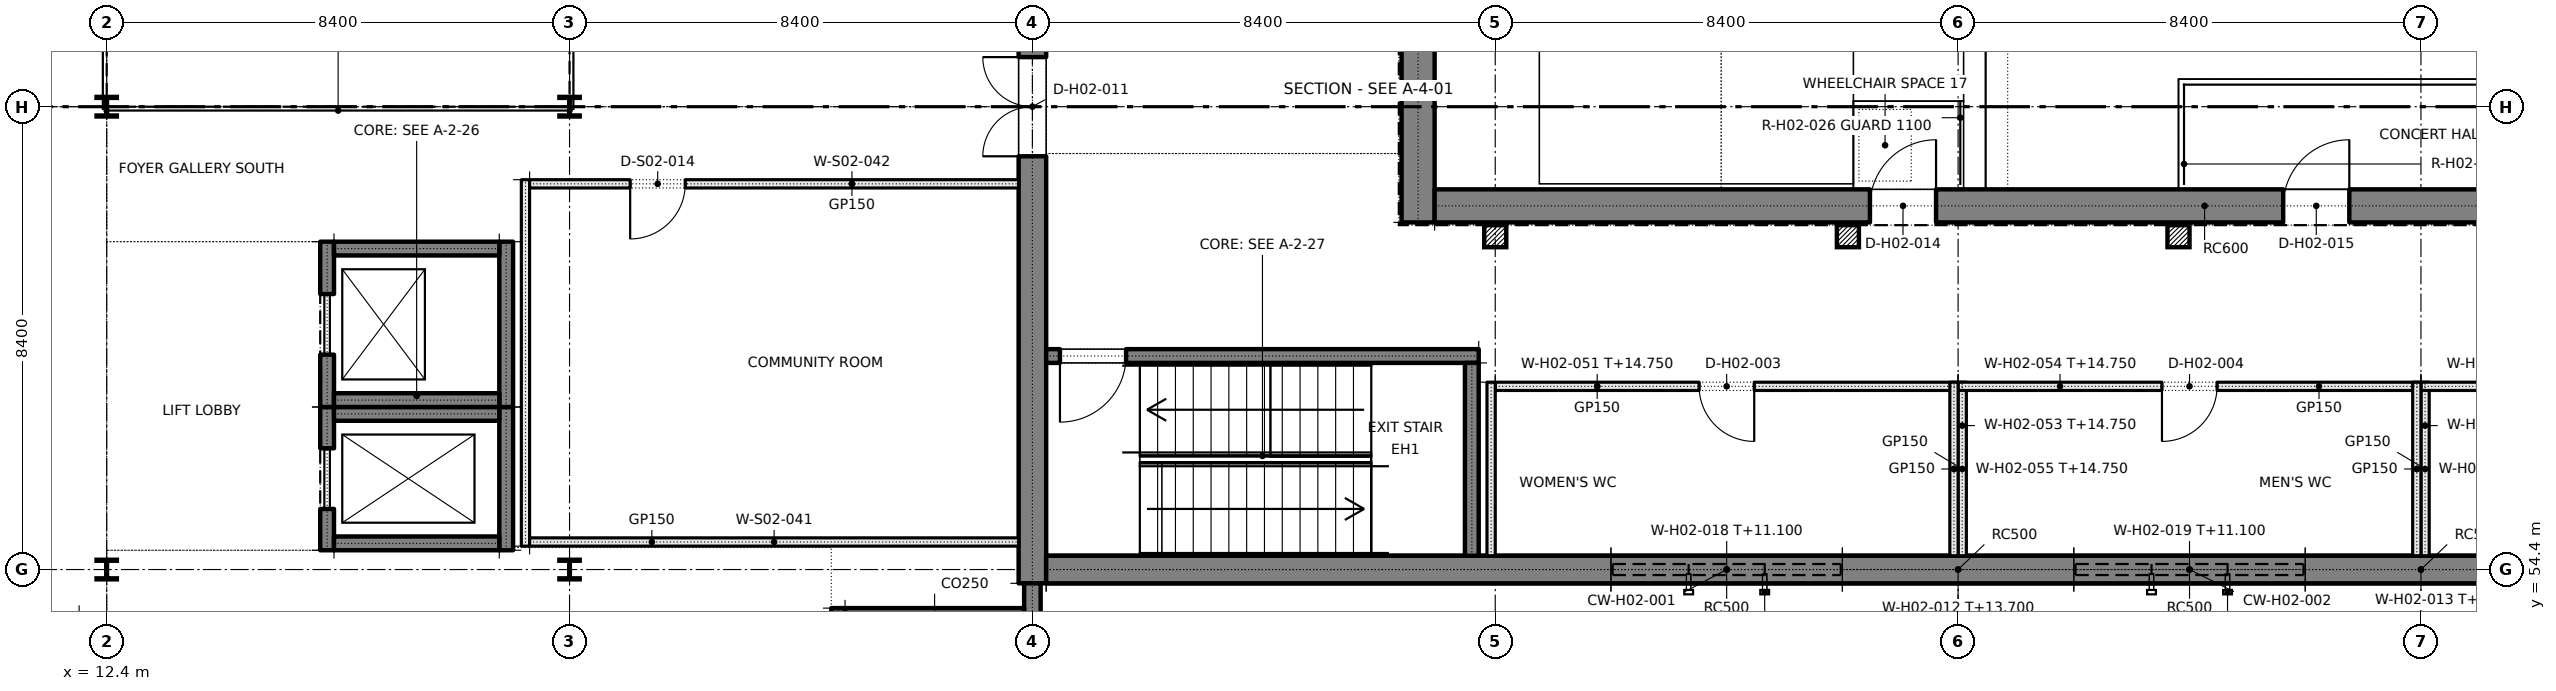
"""IFC4 building model, lengths in metres.
Left out: names, types, materials, properties, quantities, classifications, styles, units other than length and angle.
Written with IfcOpenShell. Run it as: python <this file> out.ifc"""

import sys

from ifc_helpers import new_model, si_unit, direction, frame, frame_2d, origin, origin_2d, place, context, subcontext, project, spatial, rectangle, i_section, extrude, element, fill, save


model = new_model("IFC4")
c1 = context("Model", 3, precision=1e-05, world=origin(), true_north=direction((0.0, 1.0)))
c2 = subcontext(c1, "Body", "Model", "MODEL_VIEW")
j1 = project(units=[si_unit("LENGTHUNIT", "METRE"), si_unit("PLANEANGLEUNIT", "RADIAN")], contexts=[c1])
p1 = place(None, origin())
s1 = spatial("IfcSite", under=j1, at=p1, CompositionType="ELEMENT")
p2 = place(p1, origin())
s2 = spatial("IfcBuilding", under=s1, at=p2, CompositionType="ELEMENT")
p3 = place(p2, frame((0.0, 0.0, 10.2)))
s3 = spatial("IfcBuildingStorey", under=s2, at=p3, CompositionType="ELEMENT", Elevation=10.2)
p4 = place(p3, frame((29.2, 54.15, 0.0), z_axis=(0.0, 0.0, 1.0), x_axis=(0.0, 1.0, 0.0)))
e1 = element("IfcWall", 1, at=p4, inside=s3, PredefinedType="SOLIDWALL", context=c2, shape_type="SweptSolid", body=[
    extrude(rectangle(XDim=42.5, YDim=0.5, at=frame_2d((21.25, 0.0))), origin(), (0.0, 0.0, 1.0), 4.8),
])
p5 = place(p4, frame((7.75, 0.0, 0.0)))
e2 = element("IfcOpeningElement", 2, at=p5, cuts=e1, PredefinedType="OPENING", context=c2, shape_type="SweptSolid", body=[
    extrude(rectangle(XDim=1.8, YDim=2.1, at=frame_2d((0.9, 1.05))), frame((0.0, 0.26, 0.0), z_axis=(0.0, -1.0, 0.0), x_axis=(1.0, 0.0, 0.0)), (0.0, 0.0, 1.0), 0.52),
])
p6 = place(p4, frame((20.35, 0.0, 0.0)))
e3 = element("IfcOpeningElement", 3, at=p6, cuts=e1, PredefinedType="OPENING", context=c2, shape_type="SweptSolid", body=[
    extrude(rectangle(XDim=1.8, YDim=2.1, at=frame_2d((0.9, 1.05))), frame((0.0, 0.26, 0.0), z_axis=(0.0, -1.0, 0.0), x_axis=(1.0, 0.0, 0.0)), (0.0, 0.0, 1.0), 0.52),
])
p7 = place(p4, frame((32.95, 0.0, 0.0)))
e4 = element("IfcOpeningElement", 4, at=p7, cuts=e1, PredefinedType="OPENING", context=c2, shape_type="SweptSolid", body=[
    extrude(rectangle(XDim=1.8, YDim=2.1, at=frame_2d((0.9, 1.05))), frame((0.0, 0.26, 0.0), z_axis=(0.0, -1.0, 0.0), x_axis=(1.0, 0.0, 0.0)), (0.0, 0.0, 1.0), 0.52),
])
p8 = place(p3, frame((29.45, 54.4, 0.0), z_axis=(0.0, 0.0, 1.0), x_axis=(1.0, 0.0, 0.0)))
e5 = element("IfcWall", 5, at=p8, inside=s3, PredefinedType="SOLIDWALL", context=c2, shape_type="SweptSolid", body=[
    extrude(rectangle(XDim=10.25, YDim=0.5, at=frame_2d((5.125, 0.0))), origin(), (0.0, 0.0, 1.0), 3.5),
])
p9 = place(p3, frame((43.9, 54.4, 0.0), z_axis=(0.0, 0.0, 1.0), x_axis=(1.0, 0.0, 0.0)))
e6 = element("IfcWall", 6, at=p9, inside=s3, PredefinedType="SOLIDWALL", context=c2, shape_type="SweptSolid", body=[
    extrude(rectangle(XDim=4.2, YDim=0.5, at=frame_2d((2.1, 0.0))), origin(), (0.0, 0.0, 1.0), 3.5),
])
p10 = place(p3, frame((52.3, 54.4, 0.0), z_axis=(0.0, 0.0, 1.0), x_axis=(1.0, 0.0, 0.0)))
e7 = element("IfcWall", 7, at=p10, inside=s3, PredefinedType="SOLIDWALL", context=c2, shape_type="SweptSolid", body=[
    extrude(rectangle(XDim=4.2, YDim=0.5, at=frame_2d((2.1, 0.0))), origin(), (0.0, 0.0, 1.0), 3.5),
])
for number, where, z_axis, x_axis in (
    (8, (39.7, 54.4, 0.0), (0.0, 0.0, 1.0), (1.0, 0.0, 0.0)),
    (9, (48.1, 54.4, 0.0), (0.0, 0.0, 1.0), (1.0, 0.0, 0.0)),
):
    element("IfcWall", number, at=place(p3, frame(where, z_axis=z_axis, x_axis=x_axis)), inside=s3, PredefinedType="SOLIDWALL", context=c2, shape_type="SweptSolid", body=[
        extrude(rectangle(XDim=4.2, YDim=0.5, at=frame_2d((2.1, 0.0))), origin(), (0.0, 0.0, 1.0), 0.9),
    ])
p11 = place(p3, frame((29.45, 54.4, 3.5), z_axis=(0.0, 0.0, 1.0), x_axis=(1.0, 0.0, 0.0)))
e10 = element("IfcWall", 10, at=p11, inside=s3, PredefinedType="SOLIDWALL", context=c2, shape_type="SweptSolid", body=[
    extrude(rectangle(XDim=66.7, YDim=0.5, at=frame_2d((33.35, 0.0))), origin(), (0.0, 0.0, 1.0), 1.3),
])
p12 = place(p3, frame((36.2, 60.7, 0.0), z_axis=(0.0, 0.0, 1.0), x_axis=(0.0, 1.0, 0.0)))
e11 = element("IfcWall", 11, at=p12, inside=s3, PredefinedType="SOLIDWALL", context=c2, shape_type="SweptSolid", body=[
    extrude(rectangle(XDim=29.4, YDim=0.6, at=frame_2d((14.7, 0.0))), origin(), (0.0, 0.0, 1.0), 4.8),
])
p13 = place(p3, frame((36.5, 61.0, 0.0), z_axis=(0.0, 0.0, 1.0), x_axis=(1.0, 0.0, 0.0)))
e12 = element("IfcWall", 12, at=p13, inside=s3, PredefinedType="SOLIDWALL", context=c2, shape_type="SweptSolid", body=[
    extrude(rectangle(XDim=52.6, YDim=0.6, at=frame_2d((26.3, 0.0))), origin(), (0.0, 0.0, 1.0), 4.8),
])
p14 = place(p13, frame((7.9, 0.0, 0.0)))
e13 = element("IfcOpeningElement", 13, at=p14, cuts=e12, PredefinedType="OPENING", context=c2, shape_type="SweptSolid", body=[
    extrude(rectangle(XDim=1.2, YDim=2.1, at=frame_2d((0.6, 1.05))), frame((0.0, 0.31, 0.0), z_axis=(0.0, -1.0, 0.0), x_axis=(1.0, 0.0, 0.0)), (0.0, 0.0, 1.0), 0.62),
])
p15 = place(p13, frame((15.4, 0.0, 0.0)))
e14 = element("IfcOpeningElement", 14, at=p15, cuts=e12, PredefinedType="OPENING", context=c2, shape_type="SweptSolid", body=[
    extrude(rectangle(XDim=1.2, YDim=2.1, at=frame_2d((0.6, 1.05))), frame((0.0, 0.31, 0.0), z_axis=(0.0, -1.0, 0.0), x_axis=(1.0, 0.0, 0.0)), (0.0, 0.0, 1.0), 0.62),
])
p16 = place(p13, frame((32.4, 0.0, 0.0)))
e15 = element("IfcOpeningElement", 15, at=p16, cuts=e12, PredefinedType="OPENING", context=c2, shape_type="SweptSolid", body=[
    extrude(rectangle(XDim=1.2, YDim=2.1, at=frame_2d((0.6, 1.05))), frame((0.0, 0.31, 0.0), z_axis=(0.0, -1.0, 0.0), x_axis=(1.0, 0.0, 0.0)), (0.0, 0.0, 1.0), 0.62),
])
p17 = place(p3, frame((29.45, 58.275, 0.0), z_axis=(0.0, 0.0, 1.0), x_axis=(1.0, 0.0, 0.0)))
e16 = element("IfcWall", 16, at=p17, inside=s3, PredefinedType="SOLIDWALL", context=c2, shape_type="SweptSolid", body=[
    extrude(rectangle(XDim=7.85, YDim=0.25, at=frame_2d((3.925, 0.0))), origin(), (0.0, 0.0, 1.0), 4.8),
])
p18 = place(p17, frame((0.25, 0.0, 0.0)))
e17 = element("IfcOpeningElement", 17, at=p18, cuts=e16, PredefinedType="OPENING", context=c2, shape_type="SweptSolid", body=[
    extrude(rectangle(XDim=1.2, YDim=2.1, at=frame_2d((0.6, 1.05))), frame((0.0, 0.135, 0.0), z_axis=(0.0, -1.0, 0.0), x_axis=(1.0, 0.0, 0.0)), (0.0, 0.0, 1.0), 0.27),
])
p19 = place(p3, frame((37.175, 54.65, 0.0), z_axis=(0.0, 0.0, 1.0), x_axis=(0.0, 1.0, 0.0)))
e18 = element("IfcWall", 18, at=p19, inside=s3, PredefinedType="SOLIDWALL", context=c2, shape_type="SweptSolid", body=[
    extrude(rectangle(XDim=3.5, YDim=0.25, at=frame_2d((1.75, 0.0))), origin(), (0.0, 0.0, 1.0), 4.8),
])
for number, where, z_axis, x_axis in (
    (19, (37.6, 60.45, 0.0), (0.0, 0.0, 1.0), (1.0, 0.0, 0.0)),
    (20, (44.0, 60.45, 0.0), (0.0, 0.0, 1.0), (1.0, 0.0, 0.0)),
    (21, (50.0, 60.45, 0.0), (0.0, 0.0, 1.0), (1.0, 0.0, 0.0)),
):
    element("IfcColumn", number, at=place(p3, frame(where, z_axis=z_axis, x_axis=x_axis)), inside=s3, PredefinedType="COLUMN", context=c2, shape_type="SweptSolid", body=[
        extrude(rectangle(XDim=0.4, YDim=0.4, at=origin_2d()), origin(), (0.0, 0.0, 1.0), 4.8),
    ])
for number, where, z_axis, x_axis in (
    (22, (12.4, 54.4, 0.0), (0.0, 0.0, 1.0), (1.0, 0.0, 0.0)),
    (23, (12.4, 62.8, 0.0), (0.0, 0.0, 1.0), (1.0, 0.0, 0.0)),
    (24, (20.8, 54.4, 0.0), (0.0, 0.0, 1.0), (1.0, 0.0, 0.0)),
    (25, (20.8, 62.8, 0.0), (0.0, 0.0, 1.0), (1.0, 0.0, 0.0)),
):
    element("IfcColumn", number, at=place(p3, frame(where, z_axis=z_axis, x_axis=x_axis)), inside=s3, PredefinedType="COLUMN", context=c2, shape_type="SweptSolid", body=[
        extrude(i_section(OverallWidth=0.368, OverallDepth=0.356, WebThickness=0.011, FlangeThickness=0.018, FilletRadius=0.015, at=origin_2d()), origin(), (0.0, 0.0, 1.0), 4.8),
    ])
p20 = place(p3, frame((29.2, 46.25, 0.0), z_axis=(0.0, 0.0, 1.0), x_axis=(0.0, 1.0, 0.0)))
e26 = element("IfcWall", 26, at=p20, inside=s3, PredefinedType="SOLIDWALL", context=c2, shape_type="SweptSolid", body=[
    extrude(rectangle(XDim=7.9, YDim=0.3, at=frame_2d((3.95, 0.0))), origin(), (0.0, 0.0, 1.0), 4.8),
])
p21 = place(p3, frame((37.6, 57.725, 0.0), z_axis=(0.0, 0.0, 1.0), x_axis=(1.0, 0.0, 0.0)))
e27 = element("IfcWall", 27, at=p21, inside=s3, PredefinedType="PARTITIONING", context=c2, shape_type="SweptSolid", body=[
    extrude(rectangle(XDim=8.4, YDim=0.15, at=frame_2d((4.2, 0.0))), origin(), (0.0, 0.0, 1.0), 4.55),
])
p22 = place(p21, frame((3.7, 0.0, 0.0)))
e28 = element("IfcOpeningElement", 28, at=p22, cuts=e27, PredefinedType="OPENING", context=c2, shape_type="SweptSolid", body=[
    extrude(rectangle(XDim=1.0, YDim=2.1, at=frame_2d((0.5, 1.05))), frame((0.0, 0.085, 0.0), z_axis=(0.0, -1.0, 0.0), x_axis=(1.0, 0.0, 0.0)), (0.0, 0.0, 1.0), 0.17),
])
p23 = place(p3, frame((37.525, 54.65, 0.0), z_axis=(0.0, 0.0, 1.0), x_axis=(0.0, 1.0, 0.0)))
e29 = element("IfcWall", 29, at=p23, inside=s3, PredefinedType="PARTITIONING", context=c2, shape_type="SweptSolid", body=[
    extrude(rectangle(XDim=3.15, YDim=0.15, at=frame_2d((1.575, 0.0))), origin(), (0.0, 0.0, 1.0), 3.95),
])
p24 = place(p3, frame((46.075, 54.65, 0.0), z_axis=(0.0, 0.0, 1.0), x_axis=(0.0, 1.0, 0.0)))
e30 = element("IfcWall", 30, at=p24, inside=s3, PredefinedType="PARTITIONING", context=c2, shape_type="SweptSolid", body=[
    extrude(rectangle(XDim=3.15, YDim=0.15, at=frame_2d((1.575, 0.0))), origin(), (0.0, 0.0, 1.0), 4.55),
])
p25 = place(p3, frame((46.0, 57.725, 0.0), z_axis=(0.0, 0.0, 1.0), x_axis=(1.0, 0.0, 0.0)))
e31 = element("IfcWall", 31, at=p25, inside=s3, PredefinedType="PARTITIONING", context=c2, shape_type="SweptSolid", body=[
    extrude(rectangle(XDim=8.4, YDim=0.15, at=frame_2d((4.2, 0.0))), origin(), (0.0, 0.0, 1.0), 4.55),
])
p26 = place(p25, frame((3.7, 0.0, 0.0)))
e32 = element("IfcOpeningElement", 32, at=p26, cuts=e31, PredefinedType="OPENING", context=c2, shape_type="SweptSolid", body=[
    extrude(rectangle(XDim=1.0, YDim=2.1, at=frame_2d((0.5, 1.05))), frame((0.0, 0.085, 0.0), z_axis=(0.0, -1.0, 0.0), x_axis=(1.0, 0.0, 0.0)), (0.0, 0.0, 1.0), 0.17),
])
for number, where, z_axis, x_axis in (
    (33, (45.925, 54.65, 0.0), (0.0, 0.0, 1.0), (0.0, 1.0, 0.0)),
    (34, (54.475, 54.65, 0.0), (0.0, 0.0, 1.0), (0.0, 1.0, 0.0)),
):
    element("IfcWall", number, at=place(p3, frame(where, z_axis=z_axis, x_axis=x_axis)), inside=s3, PredefinedType="PARTITIONING", context=c2, shape_type="SweptSolid", body=[
        extrude(rectangle(XDim=3.15, YDim=0.15, at=frame_2d((1.575, 0.0))), origin(), (0.0, 0.0, 1.0), 4.55),
    ])
p27 = place(p3, frame((54.4, 57.725, 0.0), z_axis=(0.0, 0.0, 1.0), x_axis=(1.0, 0.0, 0.0)))
e35 = element("IfcWall", 35, at=p27, inside=s3, PredefinedType="PARTITIONING", context=c2, shape_type="SweptSolid", body=[
    extrude(rectangle(XDim=8.4, YDim=0.15, at=frame_2d((4.2, 0.0))), origin(), (0.0, 0.0, 1.0), 4.55),
])
p28 = place(p27, frame((3.7, 0.0, 0.0)))
e36 = element("IfcOpeningElement", 36, at=p28, cuts=e35, PredefinedType="OPENING", context=c2, shape_type="SweptSolid", body=[
    extrude(rectangle(XDim=1.0, YDim=2.1, at=frame_2d((0.5, 1.05))), frame((0.0, 0.085, 0.0), z_axis=(0.0, -1.0, 0.0), x_axis=(1.0, 0.0, 0.0)), (0.0, 0.0, 1.0), 0.17),
])
p29 = place(p3, frame((54.325, 54.65, 0.0), z_axis=(0.0, 0.0, 1.0), x_axis=(0.0, 1.0, 0.0)))
e37 = element("IfcWall", 37, at=p29, inside=s3, PredefinedType="PARTITIONING", context=c2, shape_type="SweptSolid", body=[
    extrude(rectangle(XDim=3.15, YDim=0.15, at=frame_2d((1.575, 0.0))), origin(), (0.0, 0.0, 1.0), 4.55),
])
p30 = place(p3, frame((25.675, 46.25, 0.0), z_axis=(0.0, 0.0, 1.0), x_axis=(0.0, 1.0, 0.0)))
e38 = element("IfcWall", 38, at=p30, inside=s3, PredefinedType="SHEAR", context=c2, shape_type="SweptSolid", body=[
    extrude(rectangle(XDim=7.45, YDim=0.25, at=frame_2d((3.725, 0.0))), origin(), (0.0, 0.0, 1.0), 4.8),
])
p31 = place(p30, frame((0.15, 0.0, 0.0)))
e39 = element("IfcOpeningElement", 39, at=p31, cuts=e38, PredefinedType="OPENING", context=c2, shape_type="SweptSolid", body=[
    extrude(rectangle(XDim=1.1, YDim=2.1, at=frame_2d((0.55, 1.05))), frame((0.0, 0.135, 0.0), z_axis=(0.0, -1.0, 0.0), x_axis=(1.0, 0.0, 0.0)), (0.0, 0.0, 1.0), 0.27),
])
p32 = place(p3, frame((25.8, 53.575, 0.0), z_axis=(0.0, 0.0, 1.0), x_axis=(1.0, 0.0, 0.0)))
e40 = element("IfcWall", 40, at=p32, inside=s3, PredefinedType="SHEAR", context=c2, shape_type="SweptSolid", body=[
    extrude(rectangle(XDim=3.25, YDim=0.25, at=frame_2d((1.625, 0.0))), origin(), (0.0, 0.0, 1.0), 4.8),
])
p33 = place(p3, frame((16.4, 54.75, 0.0), z_axis=(0.0, 0.0, 1.0), x_axis=(0.0, 1.0, 0.0)))
e41 = element("IfcWall", 41, at=p33, inside=s3, PredefinedType="SOLIDWALL", context=c2, shape_type="SweptSolid", body=[
    extrude(rectangle(XDim=2.6, YDim=0.25, at=frame_2d((1.3, 0.0))), origin(), (0.0, 0.0, 1.0), 4.6),
])
p34 = place(p33, frame((0.75, 0.0, 0.0)))
e42 = element("IfcOpeningElement", 42, at=p34, cuts=e41, PredefinedType="OPENING", context=c2, shape_type="SweptSolid", body=[
    extrude(rectangle(XDim=1.1, YDim=2.1, at=frame_2d((0.55, 1.05))), frame((0.0, 0.135, 0.0), z_axis=(0.0, -1.0, 0.0), x_axis=(1.0, 0.0, 0.0)), (0.0, 0.0, 1.0), 0.27),
])
p35 = place(p3, frame((19.65, 54.75, 0.0), z_axis=(0.0, 0.0, 1.0), x_axis=(0.0, 1.0, 0.0)))
e43 = element("IfcWall", 43, at=p35, inside=s3, PredefinedType="SOLIDWALL", context=c2, shape_type="SweptSolid", body=[
    extrude(rectangle(XDim=2.6, YDim=0.25, at=frame_2d((1.3, 0.0))), origin(), (0.0, 0.0, 1.0), 4.6),
])
for number, where, z_axis, x_axis in (
    (44, (16.525, 54.875, 0.0), (0.0, 0.0, 1.0), (1.0, 0.0, 0.0)),
    (45, (16.525, 57.225, 0.0), (0.0, 0.0, 1.0), (1.0, 0.0, 0.0)),
):
    element("IfcWall", number, at=place(p3, frame(where, z_axis=z_axis, x_axis=x_axis)), inside=s3, PredefinedType="SOLIDWALL", context=c2, shape_type="SweptSolid", body=[
        extrude(rectangle(XDim=3.0, YDim=0.25, at=frame_2d((1.5, 0.0))), origin(), (0.0, 0.0, 1.0), 4.6),
    ])
p36 = place(p3, frame((16.4, 57.35, 0.0), z_axis=(0.0, 0.0, 1.0), x_axis=(0.0, 1.0, 0.0)))
e46 = element("IfcWall", 46, at=p36, inside=s3, PredefinedType="SOLIDWALL", context=c2, shape_type="SweptSolid", body=[
    extrude(rectangle(XDim=3.0, YDim=0.25, at=frame_2d((1.5, 0.0))), origin(), (0.0, 0.0, 1.0), 4.6),
])
p37 = place(p36, frame((0.95, 0.0, 0.0)))
e47 = element("IfcOpeningElement", 47, at=p37, cuts=e46, PredefinedType="OPENING", context=c2, shape_type="SweptSolid", body=[
    extrude(rectangle(XDim=1.1, YDim=2.1, at=frame_2d((0.55, 1.05))), frame((0.0, 0.135, 0.0), z_axis=(0.0, -1.0, 0.0), x_axis=(1.0, 0.0, 0.0)), (0.0, 0.0, 1.0), 0.27),
])
for number, where, z_axis, x_axis in (
    (48, (19.65, 57.35, 0.0), (0.0, 0.0, 1.0), (0.0, 1.0, 0.0)),
    (49, (16.525, 57.475, 0.0), (0.0, 0.0, 1.0), (1.0, 0.0, 0.0)),
    (50, (16.525, 60.225, 0.0), (0.0, 0.0, 1.0), (1.0, 0.0, 0.0)),
):
    element("IfcWall", number, at=place(p3, frame(where, z_axis=z_axis, x_axis=x_axis)), inside=s3, PredefinedType="SOLIDWALL", context=c2, shape_type="SweptSolid", body=[
        extrude(rectangle(XDim=3.0, YDim=0.25, at=frame_2d((1.5, 0.0))), origin(), (0.0, 0.0, 1.0), 4.6),
    ])
p38 = place(p3, frame((20.0, 54.825, 0.0), z_axis=(0.0, 0.0, 1.0), x_axis=(0.0, 1.0, 0.0)))
e51 = element("IfcWall", 51, at=p38, inside=s3, PredefinedType="PARTITIONING", context=c2, shape_type="SweptSolid", body=[
    extrude(rectangle(XDim=6.65, YDim=0.15, at=frame_2d((3.325, 0.0))), origin(), (0.0, 0.0, 1.0), 4.8),
])
p39 = place(p3, frame((20.075, 54.9, 0.0), z_axis=(0.0, 0.0, 1.0), x_axis=(1.0, 0.0, 0.0)))
e52 = element("IfcWall", 52, at=p39, inside=s3, PredefinedType="PARTITIONING", context=c2, shape_type="SweptSolid", body=[
    extrude(rectangle(XDim=8.875, YDim=0.15, at=frame_2d((4.438, 0.0))), origin(), (0.0, 0.0, 1.0), 4.8),
])
p40 = place(p3, frame((20.075, 61.4, 0.0), z_axis=(0.0, 0.0, 1.0), x_axis=(1.0, 0.0, 0.0)))
e53 = element("IfcWall", 53, at=p40, inside=s3, PredefinedType="PARTITIONING", context=c2, shape_type="SweptSolid", body=[
    extrude(rectangle(XDim=8.875, YDim=0.15, at=frame_2d((4.438, 0.0))), origin(), (0.0, 0.0, 1.0), 4.8),
])
p41 = place(p40, frame((1.825, 0.0, 0.0)))
e54 = element("IfcOpeningElement", 54, at=p41, cuts=e53, PredefinedType="OPENING", context=c2, shape_type="SweptSolid", body=[
    extrude(rectangle(XDim=1.0, YDim=2.1, at=frame_2d((0.5, 1.05))), frame((0.0, 0.085, 0.0), z_axis=(0.0, -1.0, 0.0), x_axis=(1.0, 0.0, 0.0)), (0.0, 0.0, 1.0), 0.17),
])
p42 = place(p22, frame((1.0, 0.0, 0.0), z_axis=(0.0, 0.0, 1.0), x_axis=(-1.0, 0.0, 0.0)))
e55 = element("IfcDoor", 55, at=p42, inside=s3, OperationType="SINGLE_SWING_LEFT", PredefinedType="DOOR", context=c2, shape_type="SweptSolid", body=[
    extrude(rectangle(XDim=1.0, YDim=2.1, at=frame_2d((0.5, 1.05))), frame((0.0, 0.025, 0.0), z_axis=(0.0, -1.0, 0.0), x_axis=(1.0, 0.0, 0.0)), (0.0, 0.0, 1.0), 0.05),
])
fill(e28, e55)
p43 = place(p26, frame((1.0, 0.0, 0.0), z_axis=(0.0, 0.0, 1.0), x_axis=(-1.0, 0.0, 0.0)))
e56 = element("IfcDoor", 56, at=p43, inside=s3, OperationType="SINGLE_SWING_RIGHT", PredefinedType="DOOR", context=c2, shape_type="SweptSolid", body=[
    extrude(rectangle(XDim=1.0, YDim=2.1, at=frame_2d((0.5, 1.05))), frame((0.0, 0.025, 0.0), z_axis=(0.0, -1.0, 0.0), x_axis=(1.0, 0.0, 0.0)), (0.0, 0.0, 1.0), 0.05),
])
fill(e32, e56)
p44 = place(p18, frame((1.2, 0.0, 0.0), z_axis=(0.0, 0.0, 1.0), x_axis=(-1.0, 0.0, 0.0)))
e57 = element("IfcDoor", 57, at=p44, inside=s3, OperationType="SINGLE_SWING_RIGHT", PredefinedType="DOOR", context=c2, shape_type="SweptSolid", body=[
    extrude(rectangle(XDim=1.2, YDim=2.1, at=frame_2d((0.6, 1.05))), frame((0.0, 0.025, 0.0), z_axis=(0.0, -1.0, 0.0), x_axis=(1.0, 0.0, 0.0)), (0.0, 0.0, 1.0), 0.05),
])
fill(e17, e57)
p45 = place(p5, origin())
e58 = element("IfcDoor", 58, at=p45, inside=s3, OperationType="DOUBLE_DOOR_SINGLE_SWING", PredefinedType="DOOR", context=c2, shape_type="SweptSolid", body=[
    extrude(rectangle(XDim=1.8, YDim=2.1, at=frame_2d((0.9, 1.05))), frame((0.0, 0.025, 0.0), z_axis=(0.0, -1.0, 0.0), x_axis=(1.0, 0.0, 0.0)), (0.0, 0.0, 1.0), 0.05),
])
fill(e2, e58)
p46 = place(p14, origin())
e59 = element("IfcDoor", 59, at=p46, inside=s3, OperationType="SINGLE_SWING_RIGHT", PredefinedType="DOOR", context=c2, shape_type="SweptSolid", body=[
    extrude(rectangle(XDim=1.2, YDim=2.1, at=frame_2d((0.6, 1.05))), frame((0.0, 0.025, 0.0), z_axis=(0.0, -1.0, 0.0), x_axis=(1.0, 0.0, 0.0)), (0.0, 0.0, 1.0), 0.05),
])
fill(e13, e59)
p47 = place(p15, origin())
e60 = element("IfcDoor", 60, at=p47, inside=s3, OperationType="SINGLE_SWING_RIGHT", PredefinedType="DOOR", context=c2, shape_type="SweptSolid", body=[
    extrude(rectangle(XDim=1.2, YDim=2.1, at=frame_2d((0.6, 1.05))), frame((0.0, 0.025, 0.0), z_axis=(0.0, -1.0, 0.0), x_axis=(1.0, 0.0, 0.0)), (0.0, 0.0, 1.0), 0.05),
])
fill(e14, e60)
p48 = place(p34, origin())
e61 = element("IfcDoor", 61, at=p48, inside=s3, OperationType="SLIDING_TO_LEFT", PredefinedType="DOOR", context=c2, shape_type="SweptSolid", body=[
    extrude(rectangle(XDim=1.1, YDim=2.1, at=frame_2d((0.55, 1.05))), frame((0.0, 0.025, 0.0), z_axis=(0.0, -1.0, 0.0), x_axis=(1.0, 0.0, 0.0)), (0.0, 0.0, 1.0), 0.05),
])
fill(e42, e61)
p49 = place(p37, origin())
e62 = element("IfcDoor", 62, at=p49, inside=s3, OperationType="SLIDING_TO_LEFT", PredefinedType="DOOR", context=c2, shape_type="SweptSolid", body=[
    extrude(rectangle(XDim=1.1, YDim=2.1, at=frame_2d((0.55, 1.05))), frame((0.0, 0.025, 0.0), z_axis=(0.0, -1.0, 0.0), x_axis=(1.0, 0.0, 0.0)), (0.0, 0.0, 1.0), 0.05),
])
fill(e47, e62)
p50 = place(p41, frame((1.0, 0.0, 0.0), z_axis=(0.0, 0.0, 1.0), x_axis=(-1.0, 0.0, 0.0)))
e63 = element("IfcDoor", 63, at=p50, inside=s3, OperationType="SINGLE_SWING_RIGHT", PredefinedType="DOOR", context=c2, shape_type="SweptSolid", body=[
    extrude(rectangle(XDim=1.0, YDim=2.1, at=frame_2d((0.5, 1.05))), frame((0.0, 0.025, 0.0), z_axis=(0.0, -1.0, 0.0), x_axis=(1.0, 0.0, 0.0)), (0.0, 0.0, 1.0), 0.05),
])
fill(e54, e63)
save(model, sys.argv[1])
